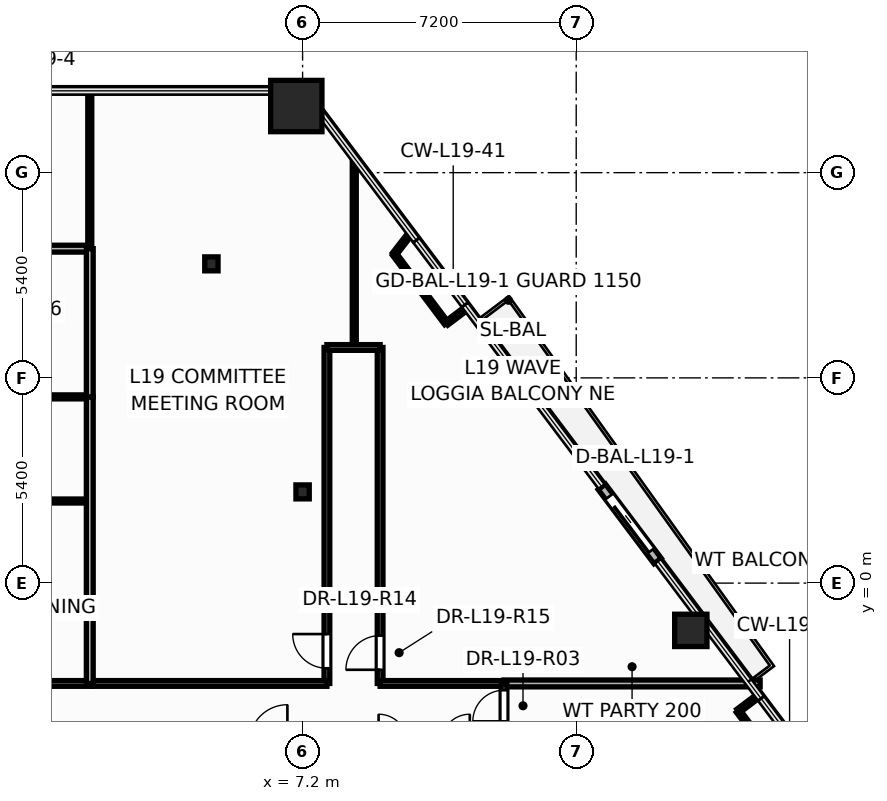
"""IFC4 building model, lengths in metres.
Left out: names, types, materials, properties, quantities, classifications, styles, units other than length and angle.
Written with IfcOpenShell. Run it as: python <this file> out.ifc"""

import sys

from ifc_helpers import new_model, si_unit, direction, frame, frame_2d, origin, origin_2d, place, context, subcontext, project, spatial, rectangle, hollow_rectangle, hollow_circle, i_section, extrude, element, fill, save


model = new_model("IFC4")
c1 = context("Model", 3, precision=1e-05, world=origin(), true_north=direction((0.0, 1.0)))
c2 = subcontext(c1, "Body", "Model", "MODEL_VIEW")
j1 = project(units=[si_unit("LENGTHUNIT", "METRE"), si_unit("PLANEANGLEUNIT", "RADIAN")], contexts=[c1])
p1 = place(None, origin())
s1 = spatial("IfcSite", under=j1, at=p1, CompositionType="ELEMENT")
p2 = place(p1, origin())
s2 = spatial("IfcBuilding", under=s1, at=p2, CompositionType="ELEMENT")
p3 = place(p2, frame((0.0, 0.0, 75.6)))
s3 = spatial("IfcBuildingStorey", under=s2, at=p3, CompositionType="ELEMENT", Elevation=75.6)
p4 = place(p3, frame((7.034, 12.553, 0.0), z_axis=(0.0, 0.0, 1.0), x_axis=(1.0, 0.0, 0.0)))
e1 = element("IfcColumn", 1, at=p4, inside=s3, PredefinedType="COLUMN", context=c2, shape_type="SweptSolid", body=[
    extrude(hollow_rectangle(XDim=1.35, YDim=1.35, WallThickness=0.065, at=origin_2d()), origin(), (0.0, 0.0, 1.0), 3.6),
])
for number, where, z_axis, x_axis in (
    (2, (17.416, -1.244, 0.0), (0.0, 0.0, 1.0), (1.0, 0.0, 0.0)),
    (3, (12.624, 5.124, 0.0), (0.0, 0.0, 1.0), (1.0, 0.0, 0.0)),
):
    element("IfcColumn", number, at=place(p3, frame(where, z_axis=z_axis, x_axis=x_axis)), inside=s3, PredefinedType="COLUMN", context=c2, shape_type="SweptSolid", body=[
        extrude(hollow_circle(Radius=0.425, WallThickness=0.038, at=origin_2d()), origin(), (0.0, 0.0, 1.0), 3.6),
    ])
for number, where, z_axis, x_axis in (
    (4, (7.2, 2.4, 0.0), (0.0, 0.0, 1.0), (1.0, 0.0, 0.0)),
    (5, (4.8, 8.4, 0.0), (0.0, 0.0, 1.0), (1.0, 0.0, 0.0)),
):
    element("IfcColumn", number, at=place(p3, frame(where, z_axis=z_axis, x_axis=x_axis)), inside=s3, PredefinedType="COLUMN", context=c2, shape_type="SweptSolid", body=[
        extrude(i_section(OverallWidth=0.35, OverallDepth=0.367, WebThickness=0.025, FlangeThickness=0.032, at=origin_2d()), origin(), (0.0, 0.0, 1.0), 3.6),
    ])
p5 = place(p3, frame((16.542, 0.583, -0.015), z_axis=(0.0, 0.0, 1.0), x_axis=(-0.601247991813, 0.799062483377, 0.0)))
e6 = element("IfcWall", 6, at=p5, inside=s3, PredefinedType="STANDARD", context=c2, shape_type="SweptSolid", body=[
    extrude(rectangle(XDim=2.44, YDim=0.24, at=frame_2d((1.22, 0.0))), origin(), (0.0, 0.0, 1.0), 2.729),
])
p6 = place(p5, frame((0.32, 0.0, 0.015)))
e7 = element("IfcOpeningElement", 7, at=p6, cuts=e6, PredefinedType="OPENING", context=c2, shape_type="SweptSolid", body=[
    extrude(rectangle(XDim=1.806, YDim=2.204, at=frame_2d((0.9, 1.102))), frame((0.0, 0.13, 0.0), z_axis=(0.0, -1.0, 0.0), x_axis=(1.0, 0.0, 0.0)), (0.0, 0.0, 1.0), 0.26),
])
p7 = place(p3, frame((-7.4, -2.64, 0.0), z_axis=(0.0, 0.0, 1.0), x_axis=(1.0, 0.0, 0.0)))
e8 = element("IfcWall", 8, at=p7, inside=s3, PredefinedType="PARTITIONING", context=c2, shape_type="SweptSolid", body=[
    extrude(rectangle(XDim=9.06, YDim=0.15, at=frame_2d((4.53, 0.0))), origin(), (0.0, 0.0, 1.0), 2.325),
])
p8 = place(p7, frame((1.672, 0.0, 0.0)))
e9 = element("IfcOpeningElement", 9, at=p8, cuts=e8, PredefinedType="OPENING", context=c2, shape_type="SweptSolid", body=[
    extrude(rectangle(XDim=0.906, YDim=2.104, at=frame_2d((0.45, 1.052))), frame((0.0, 0.085, 0.0), z_axis=(0.0, -1.0, 0.0), x_axis=(1.0, 0.0, 0.0)), (0.0, 0.0, 1.0), 0.17),
])
p9 = place(p3, frame((7.84, -2.64, 0.0), z_axis=(0.0, 0.0, 1.0), x_axis=(0.0, 1.0, 0.0)))
e10 = element("IfcWall", 10, at=p9, inside=s3, PredefinedType="PARTITIONING", context=c2, shape_type="SweptSolid", body=[
    extrude(rectangle(XDim=8.84, YDim=0.15, at=frame_2d((4.42, 0.0))), origin(), (0.0, 0.0, 1.0), 2.509),
])
p10 = place(p9, frame((0.399, 0.0, 0.0)))
e11 = element("IfcOpeningElement", 11, at=p10, cuts=e10, PredefinedType="OPENING", context=c2, shape_type="SweptSolid", body=[
    extrude(rectangle(XDim=0.906, YDim=2.104, at=frame_2d((0.45, 1.052))), frame((0.0, 0.085, 0.0), z_axis=(0.0, -1.0, 0.0), x_axis=(1.0, 0.0, 0.0)), (0.0, 0.0, 1.0), 0.17),
])
p11 = place(p3, frame((9.24, -2.64, 0.0), z_axis=(0.0, 0.0, 1.0), x_axis=(0.0, 1.0, 0.0)))
e12 = element("IfcWall", 12, at=p11, inside=s3, PredefinedType="PARTITIONING", context=c2, shape_type="SweptSolid", body=[
    extrude(rectangle(XDim=8.84, YDim=0.15, at=frame_2d((4.42, 0.0))), origin(), (0.0, 0.0, 1.0), 2.509),
])
p12 = place(p11, frame((0.359, 0.0, 0.0)))
e13 = element("IfcOpeningElement", 13, at=p12, cuts=e12, PredefinedType="OPENING", context=c2, shape_type="SweptSolid", body=[
    extrude(rectangle(XDim=0.906, YDim=2.104, at=frame_2d((0.45, 1.052))), frame((0.0, 0.085, 0.0), z_axis=(0.0, -1.0, 0.0), x_axis=(1.0, 0.0, 0.0)), (0.0, 0.0, 1.0), 0.17),
])
p13 = place(p3, frame((12.5, -2.64, 0.0), z_axis=(0.0, 0.0, 1.0), x_axis=(1.0, 0.0, 0.0)))
e14 = element("IfcWall", 14, at=p13, inside=s3, PredefinedType="PARTITIONING", context=c2, shape_type="SweptSolid", body=[
    extrude(rectangle(XDim=6.74, YDim=0.18, at=frame_2d((3.37, 0.0))), origin(), (0.0, 0.0, 1.0), 2.713),
])
p14 = place(p3, frame((-4.8, 2.16, 0.0), z_axis=(0.0, 0.0, 1.0), x_axis=(1.0, 0.0, 0.0)))
e15 = element("IfcWall", 15, at=p14, inside=s3, PredefinedType="PARTITIONING", context=c2, shape_type="SweptSolid", body=[
    extrude(rectangle(XDim=6.4, YDim=0.105, at=frame_2d((3.2, 0.0))), origin(), (0.0, 0.0, 1.0), 2.325),
])
p15 = place(p14, frame((0.398, 0.0, 0.0)))
e16 = element("IfcOpeningElement", 16, at=p15, cuts=e15, PredefinedType="OPENING", context=c2, shape_type="SweptSolid", body=[
    extrude(rectangle(XDim=0.886, YDim=2.104, at=frame_2d((0.44, 1.052))), frame((0.0, 0.062, 0.0), z_axis=(0.0, -1.0, 0.0), x_axis=(1.0, 0.0, 0.0)), (0.0, 0.0, 1.0), 0.125),
])
p16 = place(p3, frame((1.662, -2.64, 0.0), z_axis=(0.0, 0.0, 1.0), x_axis=(1.0, 0.0, 0.0)))
e17 = element("IfcWall", 17, at=p16, inside=s3, PredefinedType="PARTITIONING", context=c2, shape_type="SweptSolid", body=[
    extrude(rectangle(XDim=6.178, YDim=0.15, at=frame_2d((3.089, 0.0))), origin(), (0.0, 0.0, 1.0), 2.325),
])
p17 = place(p3, frame((8.56, 6.2, 0.0), z_axis=(0.0, 0.0, 1.0), x_axis=(0.0, 1.0, 0.0)))
e18 = element("IfcWall", 18, at=p17, inside=s3, PredefinedType="PARTITIONING", context=c2, shape_type="SweptSolid", body=[
    extrude(rectangle(XDim=4.991, YDim=0.105, at=frame_2d((2.495, 0.0))), origin(), (0.0, 0.0, 1.0), 2.509),
])
p18 = place(p3, frame((-3.32, 4.9, 0.0), z_axis=(0.0, 0.0, 1.0), x_axis=(1.0, 0.0, 0.0)))
e19 = element("IfcWall", 19, at=p18, inside=s3, PredefinedType="PARTITIONING", context=c2, shape_type="SweptSolid", body=[
    extrude(rectangle(XDim=4.92, YDim=0.105, at=frame_2d((2.46, 0.0))), origin(), (0.0, 0.0, 1.0), 2.325),
])
p19 = place(p3, frame((-7.4, 8.8, 0.0), z_axis=(0.0, 0.0, 1.0), x_axis=(1.0, 0.0, 0.0)))
e20 = element("IfcWall", 20, at=p19, inside=s3, PredefinedType="PARTITIONING", context=c2, shape_type="SweptSolid", body=[
    extrude(rectangle(XDim=9.0, YDim=0.18, at=frame_2d((4.5, 0.0))), origin(), (0.0, 0.0, 1.0), 2.509),
])
p20 = place(p3, frame((1.6, -2.64, 0.0), z_axis=(0.0, 0.0, 1.0), x_axis=(0.0, 1.0, 0.0)))
e21 = element("IfcWall", 21, at=p20, inside=s3, PredefinedType="PARTITIONING", context=c2, shape_type="SweptSolid", body=[
    extrude(rectangle(XDim=7.54, YDim=0.18, at=frame_2d((3.77, 0.0))), origin(), (0.0, 0.0, 1.0), 2.325),
])
p21 = place(p3, frame((1.6, 8.74, 0.0), z_axis=(0.0, 0.0, 1.0), x_axis=(0.0, 1.0, 0.0)))
e22 = element("IfcWall", 22, at=p21, inside=s3, PredefinedType="PARTITIONING", context=c2, shape_type="SweptSolid", body=[
    extrude(rectangle(XDim=4.213, YDim=0.105, at=frame_2d((2.106, 0.0))), origin(), (0.0, 0.0, 1.0), 2.713),
])
p22 = place(p3, frame((1.6, 4.9, 0.0), z_axis=(0.0, 0.0, 1.0), x_axis=(0.0, 1.0, 0.0)))
e23 = element("IfcWall", 23, at=p22, inside=s3, PredefinedType="PARTITIONING", context=c2, shape_type="SweptSolid", body=[
    extrude(rectangle(XDim=3.9, YDim=0.18, at=frame_2d((1.95, 0.0))), origin(), (0.0, 0.0, 1.0), 2.509),
])
p23 = place(p3, frame((9.24, -2.64, 0.0), z_axis=(0.0, 0.0, 1.0), x_axis=(1.0, 0.0, 0.0)))
e24 = element("IfcWall", 24, at=p23, inside=s3, PredefinedType="PARTITIONING", context=c2, shape_type="SweptSolid", body=[
    extrude(rectangle(XDim=3.26, YDim=0.15, at=frame_2d((1.63, 0.0))), origin(), (0.0, 0.0, 1.0), 3.35),
])
for number, where, z_axis, x_axis in (
    (25, (10.986, 6.836, 0.0), (0.0, 0.0, 1.0), (-0.601, 0.799, 0.0)),
    (26, (20.032, -5.187, 0.0), (0.0, 0.0, 1.0), (-0.601, 0.799, 0.0)),
):
    element("IfcWall", number, at=place(p3, frame(where, z_axis=z_axis, x_axis=x_axis)), inside=s3, PredefinedType="PARTITIONING", context=c2, shape_type="SweptSolid", body=[
        extrude(rectangle(XDim=2.279, YDim=0.12, at=frame_2d((1.14, 0.0))), origin(), (0.0, 0.0, 1.0), 3.35),
    ])
p24 = place(p3, frame((12.5, -4.24, 0.0), z_axis=(0.0, 0.0, 1.0), x_axis=(0.0, 1.0, 0.0)))
e27 = element("IfcWall", 27, at=p24, inside=s3, PredefinedType="PARTITIONING", context=c2, shape_type="SweptSolid", body=[
    extrude(rectangle(XDim=1.6, YDim=0.15, at=frame_2d((0.8, 0.0))), origin(), (0.0, 0.0, 1.0), 2.325),
])
p25 = place(p24, frame((0.602, 0.0, 0.0)))
e28 = element("IfcOpeningElement", 28, at=p25, cuts=e27, PredefinedType="OPENING", context=c2, shape_type="SweptSolid", body=[
    extrude(rectangle(XDim=0.826, YDim=2.104, at=frame_2d((0.41, 1.052))), frame((0.0, 0.085, 0.0), z_axis=(0.0, -1.0, 0.0), x_axis=(1.0, 0.0, 0.0)), (0.0, 0.0, 1.0), 0.17),
])
p26 = place(p3, frame((7.84, 6.2, 0.0), z_axis=(0.0, 0.0, 1.0), x_axis=(1.0, 0.0, 0.0)))
e29 = element("IfcWall", 29, at=p26, inside=s3, PredefinedType="PARTITIONING", context=c2, shape_type="SweptSolid", body=[
    extrude(rectangle(XDim=1.4, YDim=0.15, at=frame_2d((0.7, 0.0))), origin(), (0.0, 0.0, 1.0), 3.35),
])
p27 = place(p3, frame((9.615, 8.657, 0.0), z_axis=(0.0, 0.0, 1.0), x_axis=(0.613137094739, 0.789976520572, 0.0)))
e30 = element("IfcWall", 30, at=p27, inside=s3, PredefinedType="PARTITIONING", context=c2, shape_type="SweptSolid", body=[
    extrude(rectangle(XDim=0.694, YDim=0.12, at=frame_2d((0.347, 0.0))), origin(), (0.0, 0.0, 1.0), 2.713),
])
for number, where, z_axis, x_axis in (
    (31, (18.662, -3.366, 0.0), (0.0, 0.0, 1.0), (0.799, 0.601, 0.0)),
    (32, (11.521, 7.239, 0.0), (0.0, 0.0, 1.0), (-0.799, -0.601, 0.0)),
):
    element("IfcWall", number, at=place(p3, frame(where, z_axis=z_axis, x_axis=x_axis)), inside=s3, PredefinedType="PARTITIONING", context=c2, shape_type="SweptSolid", body=[
        extrude(rectangle(XDim=0.67, YDim=0.12, at=frame_2d((0.335, 0.0))), origin(), (0.0, 0.0, 1.0), 2.713),
    ])
p28 = place(p6, origin())
e33 = element("IfcDoor", 33, at=p28, inside=s3, OperationType="SLIDING_TO_LEFT", PredefinedType="DOOR", context=c2, shape_type="SweptSolid", body=[
    extrude(rectangle(XDim=1.8, YDim=2.2, at=frame_2d((0.9, 1.1))), frame((0.0, 0.025, 0.0), z_axis=(0.0, -1.0, 0.0), x_axis=(1.0, 0.0, 0.0)), (0.0, 0.0, 1.0), 0.05),
])
fill(e7, e33)
p29 = place(p25, origin())
e34 = element("IfcDoor", 34, at=p29, inside=s3, OperationType="SINGLE_SWING_LEFT", PredefinedType="DOOR", context=c2, shape_type="SweptSolid", body=[
    extrude(rectangle(XDim=0.82, YDim=2.1, at=frame_2d((0.41, 1.05))), frame((0.0, 0.025, 0.0), z_axis=(0.0, -1.0, 0.0), x_axis=(1.0, 0.0, 0.0)), (0.0, 0.0, 1.0), 0.05),
])
fill(e28, e34)
p30 = place(p10, origin())
e35 = element("IfcDoor", 35, at=p30, inside=s3, OperationType="SINGLE_SWING_RIGHT", PredefinedType="DOOR", context=c2, shape_type="SweptSolid", body=[
    extrude(rectangle(XDim=0.9, YDim=2.1, at=frame_2d((0.45, 1.05))), frame((0.0, 0.025, 0.0), z_axis=(0.0, -1.0, 0.0), x_axis=(1.0, 0.0, 0.0)), (0.0, 0.0, 1.0), 0.05),
])
fill(e11, e35)
p31 = place(p12, origin())
e36 = element("IfcDoor", 36, at=p31, inside=s3, OperationType="SINGLE_SWING_LEFT", PredefinedType="DOOR", context=c2, shape_type="SweptSolid", body=[
    extrude(rectangle(XDim=0.9, YDim=2.1, at=frame_2d((0.45, 1.05))), frame((0.0, 0.025, 0.0), z_axis=(0.0, -1.0, 0.0), x_axis=(1.0, 0.0, 0.0)), (0.0, 0.0, 1.0), 0.05),
])
fill(e13, e36)
save(model, sys.argv[1])
